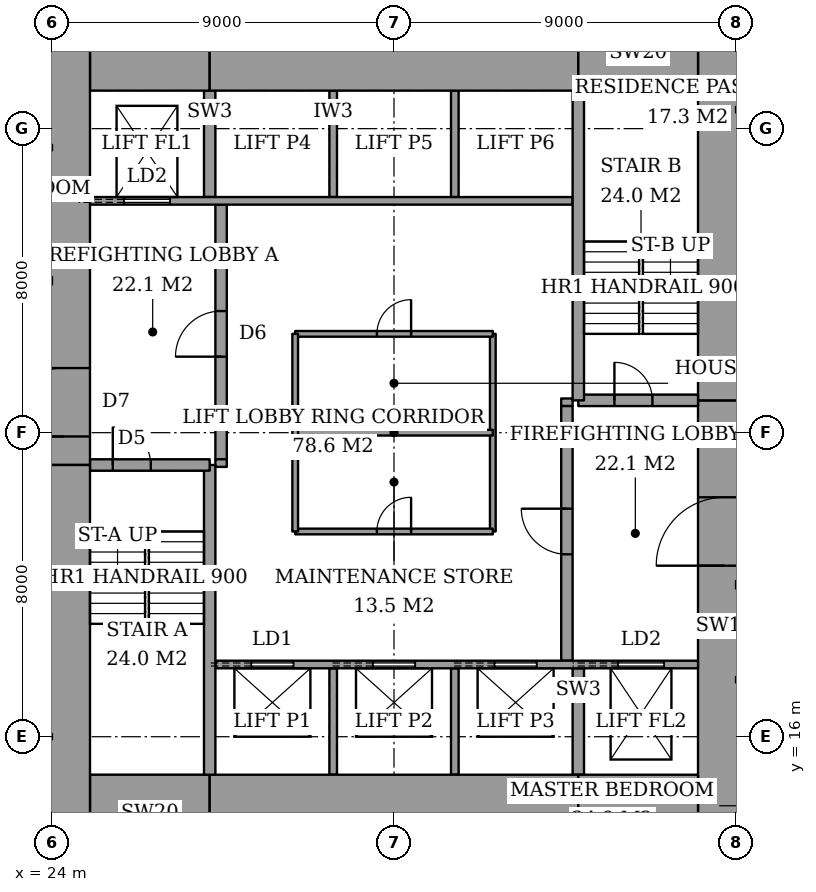
"""IFC4 building model, lengths in metres.
Left out: names, types, materials, properties, quantities, classifications, styles, units other than length and angle.
Written with IfcOpenShell. Run it as: python <this file> out.ifc"""

import sys

from ifc_helpers import new_model, si_unit, direction, frame, frame_2d, origin, place, context, subcontext, project, spatial, rectangle, extrude, element, fill, save


model = new_model("IFC4")
c1 = context("Model", 3, precision=1e-05, world=origin(), true_north=direction((0.0, 1.0)))
c2 = subcontext(c1, "Body", "Model", "MODEL_VIEW")
j1 = project(units=[si_unit("LENGTHUNIT", "METRE"), si_unit("PLANEANGLEUNIT", "RADIAN")], contexts=[c1])
p1 = place(None, origin())
s1 = spatial("IfcSite", under=j1, at=p1, CompositionType="ELEMENT")
p2 = place(p1, origin())
s2 = spatial("IfcBuilding", under=s1, at=p2, CompositionType="ELEMENT")
p3 = place(p2, frame((0.0, 0.0, 128.6)))
s3 = spatial("IfcBuildingStorey", under=s2, at=p3, CompositionType="ELEMENT", Elevation=128.6)
p4 = place(p3, frame((25.0, 14.0, 0.0), z_axis=(0.0, 0.0, 1.0), x_axis=(1.0, 0.0, 0.0)))
e1 = element("IfcWall", 1, at=p4, inside=s3, PredefinedType="SHEAR", context=c2, shape_type="SweptSolid", body=[
    extrude(rectangle(XDim=3.15, YDim=2.0, at=frame_2d((1.575, 0.0))), origin(), (0.0, 0.0, 1.0), 3.6),
])
p5 = place(p3, frame((28.15, 14.0, 0.0), z_axis=(0.0, 0.0, 1.0), x_axis=(1.0, 0.0, 0.0)))
e2 = element("IfcWall", 2, at=p5, inside=s3, PredefinedType="SHEAR", context=c2, shape_type="SweptSolid", body=[
    extrude(rectangle(XDim=9.7, YDim=2.0, at=frame_2d((4.85, 0.0))), origin(), (0.0, 0.0, 1.0), 3.6),
])
for number, where, z_axis, x_axis in (
    (3, (37.85, 14.0, 0.0), (0.0, 0.0, 1.0), (1.0, 0.0, 0.0)),
    (4, (25.0, 34.0, 0.0), (0.0, 0.0, 1.0), (1.0, 0.0, 0.0)),
):
    element("IfcWall", number, at=place(p3, frame(where, z_axis=z_axis, x_axis=x_axis)), inside=s3, PredefinedType="SHEAR", context=c2, shape_type="SweptSolid", body=[
        extrude(rectangle(XDim=3.15, YDim=2.0, at=frame_2d((1.575, 0.0))), origin(), (0.0, 0.0, 1.0), 3.6),
    ])
p6 = place(p3, frame((28.15, 34.0, 0.0), z_axis=(0.0, 0.0, 1.0), x_axis=(1.0, 0.0, 0.0)))
e5 = element("IfcWall", 5, at=p6, inside=s3, PredefinedType="SHEAR", context=c2, shape_type="SweptSolid", body=[
    extrude(rectangle(XDim=9.7, YDim=2.0, at=frame_2d((4.85, 0.0))), origin(), (0.0, 0.0, 1.0), 3.6),
])
p7 = place(p3, frame((37.85, 34.0, 0.0), z_axis=(0.0, 0.0, 1.0), x_axis=(1.0, 0.0, 0.0)))
e6 = element("IfcWall", 6, at=p7, inside=s3, PredefinedType="SHEAR", context=c2, shape_type="SweptSolid", body=[
    extrude(rectangle(XDim=3.15, YDim=2.0, at=frame_2d((1.575, 0.0))), origin(), (0.0, 0.0, 1.0), 3.6),
])
p8 = place(p3, frame((24.3, 13.0, 0.0), z_axis=(0.0, 0.0, 1.0), x_axis=(0.0, 1.0, 0.0)))
e7 = element("IfcWall", 7, at=p8, inside=s3, PredefinedType="SHEAR", context=c2, shape_type="SweptSolid", body=[
    extrude(rectangle(XDim=10.15, YDim=1.4, at=frame_2d((5.075, 0.0))), origin(), (0.0, 0.0, 1.0), 3.6),
])
p9 = place(p3, frame((24.3, 23.15, 0.0), z_axis=(0.0, 0.0, 1.0), x_axis=(0.0, 1.0, 0.0)))
e8 = element("IfcWall", 8, at=p9, inside=s3, PredefinedType="SHEAR", context=c2, shape_type="SweptSolid", body=[
    extrude(rectangle(XDim=11.85, YDim=1.4, at=frame_2d((5.925, 0.0))), origin(), (0.0, 0.0, 1.0), 3.6),
])
p10 = place(p9, frame((0.75, 0.0, 0.0)))
e9 = element("IfcOpeningElement", 9, at=p10, cuts=e8, PredefinedType="OPENING", context=c2, shape_type="SweptSolid", body=[
    extrude(rectangle(XDim=1.8, YDim=2.4, at=frame_2d((0.9, 1.2))), frame((0.0, 0.71, 0.0), z_axis=(0.0, -1.0, 0.0), x_axis=(1.0, 0.0, 0.0)), (0.0, 0.0, 1.0), 1.42),
])
p11 = place(p3, frame((41.7, 13.0, 0.0), z_axis=(0.0, 0.0, 1.0), x_axis=(0.0, 1.0, 0.0)))
e10 = element("IfcWall", 10, at=p11, inside=s3, PredefinedType="SHEAR", context=c2, shape_type="SweptSolid", body=[
    extrude(rectangle(XDim=11.85, YDim=1.4, at=frame_2d((5.925, 0.0))), origin(), (0.0, 0.0, 1.0), 3.6),
])
p12 = place(p11, frame((7.5, 0.0, 0.0)))
e11 = element("IfcOpeningElement", 11, at=p12, cuts=e10, PredefinedType="OPENING", context=c2, shape_type="SweptSolid", body=[
    extrude(rectangle(XDim=1.8, YDim=2.4, at=frame_2d((0.9, 1.2))), frame((0.0, 0.71, 0.0), z_axis=(0.0, -1.0, 0.0), x_axis=(1.0, 0.0, 0.0)), (0.0, 0.0, 1.0), 1.42),
])
p13 = place(p3, frame((41.7, 24.85, 0.0), z_axis=(0.0, 0.0, 1.0), x_axis=(0.0, 1.0, 0.0)))
e12 = element("IfcWall", 12, at=p13, inside=s3, PredefinedType="SHEAR", context=c2, shape_type="SweptSolid", body=[
    extrude(rectangle(XDim=10.15, YDim=1.4, at=frame_2d((5.075, 0.0))), origin(), (0.0, 0.0, 1.0), 3.6),
])
p14 = place(p3, frame((28.15, 15.0, 0.0), z_axis=(0.0, 0.0, 1.0), x_axis=(0.0, 1.0, 0.0)))
e13 = element("IfcWall", 13, at=p14, inside=s3, PredefinedType="SHEAR", context=c2, shape_type="SweptSolid", body=[
    extrude(rectangle(XDim=8.15, YDim=0.3, at=frame_2d((4.075, 0.0))), origin(), (0.0, 0.0, 1.0), 3.6),
])
p15 = place(p3, frame((25.0, 23.15, 0.0), z_axis=(0.0, 0.0, 1.0), x_axis=(1.0, 0.0, 0.0)))
e14 = element("IfcWall", 14, at=p15, inside=s3, PredefinedType="SHEAR", context=c2, shape_type="SweptSolid", body=[
    extrude(rectangle(XDim=3.15, YDim=0.3, at=frame_2d((1.575, 0.0))), origin(), (0.0, 0.0, 1.0), 3.6),
])
p16 = place(p15, frame((0.6, 0.0, 0.0)))
e15 = element("IfcOpeningElement", 15, at=p16, cuts=e14, PredefinedType="OPENING", context=c2, shape_type="SweptSolid", body=[
    extrude(rectangle(XDim=1.0, YDim=2.1, at=frame_2d((0.5, 1.05))), frame((0.0, 0.16, 0.0), z_axis=(0.0, -1.0, 0.0), x_axis=(1.0, 0.0, 0.0)), (0.0, 0.0, 1.0), 0.32),
])
p17 = place(p3, frame((37.85, 24.85, 0.0), z_axis=(0.0, 0.0, 1.0), x_axis=(0.0, 1.0, 0.0)))
e16 = element("IfcWall", 16, at=p17, inside=s3, PredefinedType="SHEAR", context=c2, shape_type="SweptSolid", body=[
    extrude(rectangle(XDim=8.15, YDim=0.3, at=frame_2d((4.075, 0.0))), origin(), (0.0, 0.0, 1.0), 3.6),
])
p18 = place(p3, frame((37.85, 24.85, 0.0), z_axis=(0.0, 0.0, 1.0), x_axis=(1.0, 0.0, 0.0)))
e17 = element("IfcWall", 17, at=p18, inside=s3, PredefinedType="SHEAR", context=c2, shape_type="SweptSolid", body=[
    extrude(rectangle(XDim=3.15, YDim=0.3, at=frame_2d((1.575, 0.0))), origin(), (0.0, 0.0, 1.0), 3.6),
])
p19 = place(p18, frame((0.95, 0.0, 0.0)))
e18 = element("IfcOpeningElement", 18, at=p19, cuts=e17, PredefinedType="OPENING", context=c2, shape_type="SweptSolid", body=[
    extrude(rectangle(XDim=1.0, YDim=2.1, at=frame_2d((0.5, 1.05))), frame((0.0, 0.16, 0.0), z_axis=(0.0, -1.0, 0.0), x_axis=(1.0, 0.0, 0.0)), (0.0, 0.0, 1.0), 0.32),
])
p20 = place(p3, frame((28.45, 23.3, 0.0), z_axis=(0.0, 0.0, 1.0), x_axis=(0.0, 1.0, 0.0)))
e19 = element("IfcWall", 19, at=p20, inside=s3, PredefinedType="PARTITIONING", context=c2, shape_type="SweptSolid", body=[
    extrude(rectangle(XDim=6.7, YDim=0.3, at=frame_2d((3.35, 0.0))), origin(), (0.0, 0.0, 1.0), 3.6),
])
p21 = place(p20, frame((2.7, 0.0, 0.0)))
e20 = element("IfcOpeningElement", 20, at=p21, cuts=e19, PredefinedType="OPENING", context=c2, shape_type="SweptSolid", body=[
    extrude(rectangle(XDim=1.2, YDim=2.1, at=frame_2d((0.6, 1.05))), frame((0.0, 0.16, 0.0), z_axis=(0.0, -1.0, 0.0), x_axis=(1.0, 0.0, 0.0)), (0.0, 0.0, 1.0), 0.32),
])
p22 = place(p3, frame((37.55, 18.0, 0.0), z_axis=(0.0, 0.0, 1.0), x_axis=(0.0, 1.0, 0.0)))
e21 = element("IfcWall", 21, at=p22, inside=s3, PredefinedType="PARTITIONING", context=c2, shape_type="SweptSolid", body=[
    extrude(rectangle(XDim=6.7, YDim=0.3, at=frame_2d((3.35, 0.0))), origin(), (0.0, 0.0, 1.0), 3.6),
])
p23 = place(p22, frame((2.8, 0.0, 0.0)))
e22 = element("IfcOpeningElement", 22, at=p23, cuts=e21, PredefinedType="OPENING", context=c2, shape_type="SweptSolid", body=[
    extrude(rectangle(XDim=1.2, YDim=2.1, at=frame_2d((0.6, 1.05))), frame((0.0, 0.16, 0.0), z_axis=(0.0, -1.0, 0.0), x_axis=(1.0, 0.0, 0.0)), (0.0, 0.0, 1.0), 0.32),
])
p24 = place(p3, frame((28.3, 17.9, 0.0), z_axis=(0.0, 0.0, 1.0), x_axis=(1.0, 0.0, 0.0)))
e23 = element("IfcWall", 23, at=p24, inside=s3, PredefinedType="PARTITIONING", context=c2, shape_type="SweptSolid", body=[
    extrude(rectangle(XDim=12.7, YDim=0.2, at=frame_2d((6.35, 0.0))), origin(), (0.0, 0.0, 1.0), 3.6),
])
p25 = place(p24, frame((0.95, 0.0, 0.0)))
e24 = element("IfcOpeningElement", 24, at=p25, cuts=e23, PredefinedType="OPENING", context=c2, shape_type="SweptSolid", body=[
    extrude(rectangle(XDim=1.1, YDim=2.1, at=frame_2d((0.55, 1.05))), frame((0.0, 0.11, 0.0), z_axis=(0.0, -1.0, 0.0), x_axis=(1.0, 0.0, 0.0)), (0.0, 0.0, 1.0), 0.22),
])
p26 = place(p24, frame((4.15, 0.0, 0.0)))
e25 = element("IfcOpeningElement", 25, at=p26, cuts=e23, PredefinedType="OPENING", context=c2, shape_type="SweptSolid", body=[
    extrude(rectangle(XDim=1.1, YDim=2.1, at=frame_2d((0.55, 1.05))), frame((0.0, 0.11, 0.0), z_axis=(0.0, -1.0, 0.0), x_axis=(1.0, 0.0, 0.0)), (0.0, 0.0, 1.0), 0.22),
])
p27 = place(p24, frame((7.35, 0.0, 0.0)))
e26 = element("IfcOpeningElement", 26, at=p27, cuts=e23, PredefinedType="OPENING", context=c2, shape_type="SweptSolid", body=[
    extrude(rectangle(XDim=1.1, YDim=2.1, at=frame_2d((0.55, 1.05))), frame((0.0, 0.11, 0.0), z_axis=(0.0, -1.0, 0.0), x_axis=(1.0, 0.0, 0.0)), (0.0, 0.0, 1.0), 0.22),
])
p28 = place(p24, frame((10.6, 0.0, 0.0)))
e27 = element("IfcOpeningElement", 27, at=p28, cuts=e23, PredefinedType="OPENING", context=c2, shape_type="SweptSolid", body=[
    extrude(rectangle(XDim=1.2, YDim=2.1, at=frame_2d((0.6, 1.05))), frame((0.0, 0.11, 0.0), z_axis=(0.0, -1.0, 0.0), x_axis=(1.0, 0.0, 0.0)), (0.0, 0.0, 1.0), 0.22),
])
p29 = place(p3, frame((25.0, 30.1, 0.0), z_axis=(0.0, 0.0, 1.0), x_axis=(1.0, 0.0, 0.0)))
e28 = element("IfcWall", 28, at=p29, inside=s3, PredefinedType="PARTITIONING", context=c2, shape_type="SweptSolid", body=[
    extrude(rectangle(XDim=12.7, YDim=0.2, at=frame_2d((6.35, 0.0))), origin(), (0.0, 0.0, 1.0), 3.6),
])
p30 = place(p29, frame((0.9, 0.0, 0.0)))
e29 = element("IfcOpeningElement", 29, at=p30, cuts=e28, PredefinedType="OPENING", context=c2, shape_type="SweptSolid", body=[
    extrude(rectangle(XDim=1.2, YDim=2.1, at=frame_2d((0.6, 1.05))), frame((0.0, 0.11, 0.0), z_axis=(0.0, -1.0, 0.0), x_axis=(1.0, 0.0, 0.0)), (0.0, 0.0, 1.0), 0.22),
])
for number, where, z_axis, x_axis in (
    (30, (31.4, 15.0, 0.0), (0.0, 0.0, 1.0), (0.0, 1.0, 0.0)),
    (31, (34.6, 15.0, 0.0), (0.0, 0.0, 1.0), (0.0, 1.0, 0.0)),
):
    element("IfcWall", number, at=place(p3, frame(where, z_axis=z_axis, x_axis=x_axis)), inside=s3, PredefinedType="PARTITIONING", context=c2, shape_type="SweptSolid", body=[
        extrude(rectangle(XDim=2.8, YDim=0.2, at=frame_2d((1.4, 0.0))), origin(), (0.0, 0.0, 1.0), 3.6),
    ])
p31 = place(p3, frame((37.85, 15.0, 0.0), z_axis=(0.0, 0.0, 1.0), x_axis=(0.0, 1.0, 0.0)))
e32 = element("IfcWall", 32, at=p31, inside=s3, PredefinedType="SHEAR", context=c2, shape_type="SweptSolid", body=[
    extrude(rectangle(XDim=2.8, YDim=0.3, at=frame_2d((1.4, 0.0))), origin(), (0.0, 0.0, 1.0), 3.6),
])
for number, where, z_axis, x_axis in (
    (33, (31.4, 30.2, 0.0), (0.0, 0.0, 1.0), (0.0, 1.0, 0.0)),
    (34, (34.6, 30.2, 0.0), (0.0, 0.0, 1.0), (0.0, 1.0, 0.0)),
):
    element("IfcWall", number, at=place(p3, frame(where, z_axis=z_axis, x_axis=x_axis)), inside=s3, PredefinedType="PARTITIONING", context=c2, shape_type="SweptSolid", body=[
        extrude(rectangle(XDim=2.8, YDim=0.2, at=frame_2d((1.4, 0.0))), origin(), (0.0, 0.0, 1.0), 3.6),
    ])
p32 = place(p3, frame((28.15, 30.2, 0.0), z_axis=(0.0, 0.0, 1.0), x_axis=(0.0, 1.0, 0.0)))
e35 = element("IfcWall", 35, at=p32, inside=s3, PredefinedType="SHEAR", context=c2, shape_type="SweptSolid", body=[
    extrude(rectangle(XDim=2.8, YDim=0.3, at=frame_2d((1.4, 0.0))), origin(), (0.0, 0.0, 1.0), 3.6),
])
for number, where, z_axis, x_axis in (
    (36, (28.3, 23.2, 0.0), (0.0, 0.0, 1.0), (1.0, 0.0, 0.0)),
    (37, (37.4, 24.8, 0.0), (0.0, 0.0, 1.0), (1.0, 0.0, 0.0)),
):
    element("IfcWall", number, at=place(p3, frame(where, z_axis=z_axis, x_axis=x_axis)), inside=s3, PredefinedType="PARTITIONING", context=c2, shape_type="SweptSolid", body=[
        extrude(rectangle(XDim=0.3, YDim=0.2, at=frame_2d((0.15, 0.0))), origin(), (0.0, 0.0, 1.0), 3.6),
    ])
p33 = place(p3, frame((30.4, 21.4, 0.0), z_axis=(0.0, 0.0, 1.0), x_axis=(1.0, 0.0, 0.0)))
e38 = element("IfcWall", 38, at=p33, inside=s3, PredefinedType="PARTITIONING", context=c2, shape_type="SweptSolid", body=[
    extrude(rectangle(XDim=5.2, YDim=0.15, at=frame_2d((2.6, 0.0))), origin(), (0.0, 0.0, 1.0), 3.35),
])
p34 = place(p33, frame((2.15, 0.0, 0.0)))
e39 = element("IfcOpeningElement", 39, at=p34, cuts=e38, PredefinedType="OPENING", context=c2, shape_type="SweptSolid", body=[
    extrude(rectangle(XDim=0.9, YDim=2.1, at=frame_2d((0.45, 1.05))), frame((0.0, 0.085, 0.0), z_axis=(0.0, -1.0, 0.0), x_axis=(1.0, 0.0, 0.0)), (0.0, 0.0, 1.0), 0.17),
])
p35 = place(p3, frame((30.4, 26.6, 0.0), z_axis=(0.0, 0.0, 1.0), x_axis=(1.0, 0.0, 0.0)))
e40 = element("IfcWall", 40, at=p35, inside=s3, PredefinedType="PARTITIONING", context=c2, shape_type="SweptSolid", body=[
    extrude(rectangle(XDim=5.2, YDim=0.15, at=frame_2d((2.6, 0.0))), origin(), (0.0, 0.0, 1.0), 3.35),
])
p36 = place(p35, frame((2.15, 0.0, 0.0)))
e41 = element("IfcOpeningElement", 41, at=p36, cuts=e40, PredefinedType="OPENING", context=c2, shape_type="SweptSolid", body=[
    extrude(rectangle(XDim=0.9, YDim=2.1, at=frame_2d((0.45, 1.05))), frame((0.0, 0.085, 0.0), z_axis=(0.0, -1.0, 0.0), x_axis=(1.0, 0.0, 0.0)), (0.0, 0.0, 1.0), 0.17),
])
for number, where, z_axis, x_axis in (
    (42, (30.4, 21.4, 0.0), (0.0, 0.0, 1.0), (0.0, 1.0, 0.0)),
    (43, (35.6, 21.4, 0.0), (0.0, 0.0, 1.0), (0.0, 1.0, 0.0)),
    (44, (30.4, 24.0, 0.0), (0.0, 0.0, 1.0), (1.0, 0.0, 0.0)),
):
    element("IfcWall", number, at=place(p3, frame(where, z_axis=z_axis, x_axis=x_axis)), inside=s3, PredefinedType="PARTITIONING", context=c2, shape_type="SweptSolid", body=[
        extrude(rectangle(XDim=5.2, YDim=0.15, at=frame_2d((2.6, 0.0))), origin(), (0.0, 0.0, 1.0), 3.35),
    ])
p37 = place(p16, origin())
e45 = element("IfcDoor", 45, at=p37, inside=s3, OperationType="SINGLE_SWING_RIGHT", PredefinedType="DOOR", context=c2, shape_type="SweptSolid", body=[
    extrude(rectangle(XDim=1.0, YDim=2.1, at=frame_2d((0.5, 1.05))), frame((0.0, 0.025, 0.0), z_axis=(0.0, -1.0, 0.0), x_axis=(1.0, 0.0, 0.0)), (0.0, 0.0, 1.0), 0.05),
])
fill(e15, e45)
p38 = place(p19, origin())
e46 = element("IfcDoor", 46, at=p38, inside=s3, OperationType="SINGLE_SWING_RIGHT", PredefinedType="DOOR", context=c2, shape_type="SweptSolid", body=[
    extrude(rectangle(XDim=1.0, YDim=2.1, at=frame_2d((0.5, 1.05))), frame((0.0, 0.025, 0.0), z_axis=(0.0, -1.0, 0.0), x_axis=(1.0, 0.0, 0.0)), (0.0, 0.0, 1.0), 0.05),
])
fill(e18, e46)
p39 = place(p21, origin())
e47 = element("IfcDoor", 47, at=p39, inside=s3, OperationType="SINGLE_SWING_RIGHT", PredefinedType="DOOR", context=c2, shape_type="SweptSolid", body=[
    extrude(rectangle(XDim=1.2, YDim=2.1, at=frame_2d((0.6, 1.05))), frame((0.0, 0.025, 0.0), z_axis=(0.0, -1.0, 0.0), x_axis=(1.0, 0.0, 0.0)), (0.0, 0.0, 1.0), 0.05),
])
fill(e20, e47)
p40 = place(p23, origin())
e48 = element("IfcDoor", 48, at=p40, inside=s3, OperationType="SINGLE_SWING_LEFT", PredefinedType="DOOR", context=c2, shape_type="SweptSolid", body=[
    extrude(rectangle(XDim=1.2, YDim=2.1, at=frame_2d((0.6, 1.05))), frame((0.0, 0.025, 0.0), z_axis=(0.0, -1.0, 0.0), x_axis=(1.0, 0.0, 0.0)), (0.0, 0.0, 1.0), 0.05),
])
fill(e22, e48)
p41 = place(p10, origin())
e49 = element("IfcDoor", 49, at=p41, inside=s3, OperationType="DOUBLE_DOOR_DOUBLE_SWING", PredefinedType="DOOR", context=c2, shape_type="SweptSolid", body=[
    extrude(rectangle(XDim=1.8, YDim=2.4, at=frame_2d((0.9, 1.2))), frame((0.0, 0.025, 0.0), z_axis=(0.0, -1.0, 0.0), x_axis=(1.0, 0.0, 0.0)), (0.0, 0.0, 1.0), 0.05),
])
fill(e9, e49)
p42 = place(p12, origin())
e50 = element("IfcDoor", 50, at=p42, inside=s3, OperationType="DOUBLE_DOOR_DOUBLE_SWING", PredefinedType="DOOR", context=c2, shape_type="SweptSolid", body=[
    extrude(rectangle(XDim=1.8, YDim=2.4, at=frame_2d((0.9, 1.2))), frame((0.0, 0.025, 0.0), z_axis=(0.0, -1.0, 0.0), x_axis=(1.0, 0.0, 0.0)), (0.0, 0.0, 1.0), 0.05),
])
fill(e11, e50)
p43 = place(p34, origin())
e51 = element("IfcDoor", 51, at=p43, inside=s3, OperationType="SINGLE_SWING_LEFT", PredefinedType="DOOR", context=c2, shape_type="SweptSolid", body=[
    extrude(rectangle(XDim=0.9, YDim=2.1, at=frame_2d((0.45, 1.05))), frame((0.0, 0.025, 0.0), z_axis=(0.0, -1.0, 0.0), x_axis=(1.0, 0.0, 0.0)), (0.0, 0.0, 1.0), 0.05),
])
fill(e39, e51)
p44 = place(p36, origin())
e52 = element("IfcDoor", 52, at=p44, inside=s3, OperationType="SINGLE_SWING_LEFT", PredefinedType="DOOR", context=c2, shape_type="SweptSolid", body=[
    extrude(rectangle(XDim=0.9, YDim=2.1, at=frame_2d((0.45, 1.05))), frame((0.0, 0.025, 0.0), z_axis=(0.0, -1.0, 0.0), x_axis=(1.0, 0.0, 0.0)), (0.0, 0.0, 1.0), 0.05),
])
fill(e41, e52)
p45 = place(p25, origin())
e53 = element("IfcDoor", 53, at=p45, inside=s3, OperationType="SLIDING_TO_LEFT", PredefinedType="DOOR", context=c2, shape_type="SweptSolid", body=[
    extrude(rectangle(XDim=1.1, YDim=2.1, at=frame_2d((0.55, 1.05))), frame((0.0, 0.025, 0.0), z_axis=(0.0, -1.0, 0.0), x_axis=(1.0, 0.0, 0.0)), (0.0, 0.0, 1.0), 0.05),
])
fill(e24, e53)
p46 = place(p26, origin())
e54 = element("IfcDoor", 54, at=p46, inside=s3, OperationType="SLIDING_TO_LEFT", PredefinedType="DOOR", context=c2, shape_type="SweptSolid", body=[
    extrude(rectangle(XDim=1.1, YDim=2.1, at=frame_2d((0.55, 1.05))), frame((0.0, 0.025, 0.0), z_axis=(0.0, -1.0, 0.0), x_axis=(1.0, 0.0, 0.0)), (0.0, 0.0, 1.0), 0.05),
])
fill(e25, e54)
p47 = place(p27, origin())
e55 = element("IfcDoor", 55, at=p47, inside=s3, OperationType="SLIDING_TO_LEFT", PredefinedType="DOOR", context=c2, shape_type="SweptSolid", body=[
    extrude(rectangle(XDim=1.1, YDim=2.1, at=frame_2d((0.55, 1.05))), frame((0.0, 0.025, 0.0), z_axis=(0.0, -1.0, 0.0), x_axis=(1.0, 0.0, 0.0)), (0.0, 0.0, 1.0), 0.05),
])
fill(e26, e55)
p48 = place(p30, origin())
e56 = element("IfcDoor", 56, at=p48, inside=s3, OperationType="SLIDING_TO_LEFT", PredefinedType="DOOR", context=c2, shape_type="SweptSolid", body=[
    extrude(rectangle(XDim=1.2, YDim=2.1, at=frame_2d((0.6, 1.05))), frame((0.0, 0.025, 0.0), z_axis=(0.0, -1.0, 0.0), x_axis=(1.0, 0.0, 0.0)), (0.0, 0.0, 1.0), 0.05),
])
fill(e29, e56)
p49 = place(p28, origin())
e57 = element("IfcDoor", 57, at=p49, inside=s3, OperationType="SLIDING_TO_LEFT", PredefinedType="DOOR", context=c2, shape_type="SweptSolid", body=[
    extrude(rectangle(XDim=1.2, YDim=2.1, at=frame_2d((0.6, 1.05))), frame((0.0, 0.025, 0.0), z_axis=(0.0, -1.0, 0.0), x_axis=(1.0, 0.0, 0.0)), (0.0, 0.0, 1.0), 0.05),
])
fill(e27, e57)
save(model, sys.argv[1])
